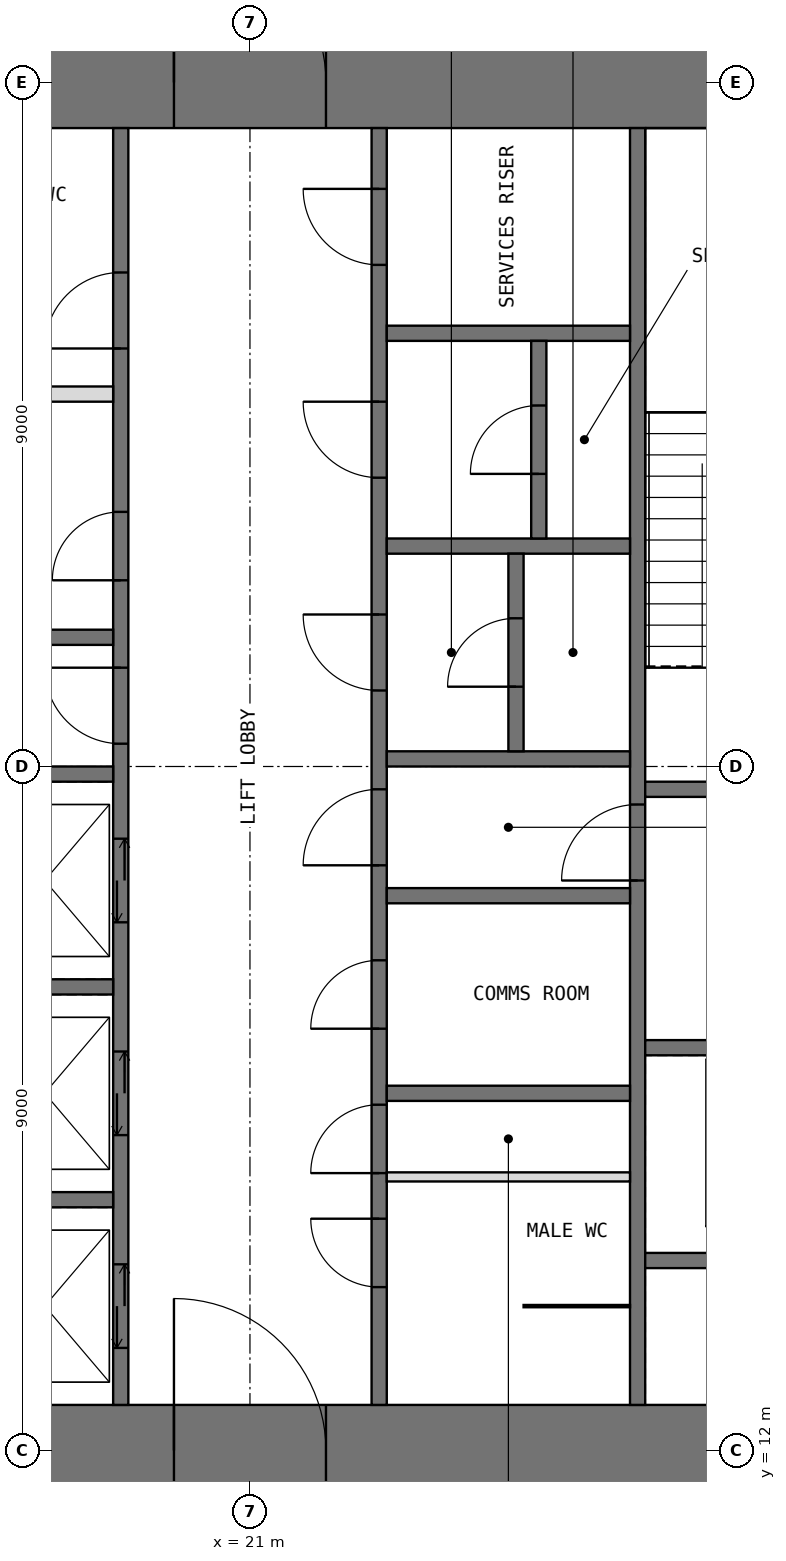
"""IFC4 building model, lengths in metres.
Left out: names, types, materials, properties, quantities, classifications, styles, units other than length and angle.
Written with IfcOpenShell. Run it as: python <this file> out.ifc"""

import sys

from ifc_helpers import new_model, si_unit, direction, frame, frame_2d, origin, place, context, subcontext, project, spatial, rectangle, extrude, element, fill, save


model = new_model("IFC4")
c1 = context("Model", 3, precision=1e-05, world=origin(), true_north=direction((0.0, 1.0)))
c2 = subcontext(c1, "Body", "Model", "MODEL_VIEW")
j1 = project(units=[si_unit("LENGTHUNIT", "METRE"), si_unit("PLANEANGLEUNIT", "RADIAN")], contexts=[c1])
p1 = place(None, origin())
s1 = spatial("IfcSite", under=j1, at=p1, CompositionType="ELEMENT")
p2 = place(p1, origin())
s2 = spatial("IfcBuilding", under=s1, at=p2, CompositionType="ELEMENT")
p3 = place(p2, frame((0.0, 0.0, 256.6)))
s3 = spatial("IfcBuildingStorey", under=s2, at=p3, CompositionType="ELEMENT", Elevation=256.6)
p4 = place(p3, frame((11.4, 12.0, -0.05), z_axis=(0.0, 0.0, 1.0), x_axis=(1.0, 0.0, 0.0)))
e1 = element("IfcWall", 1, at=p4, inside=s3, PredefinedType="SHEAR", context=c2, shape_type="SweptSolid", body=[
    extrude(rectangle(XDim=19.2, YDim=1.2, at=frame_2d((9.6, 0.0))), origin(), (0.0, 0.0, 1.0), 4.2),
])
p5 = place(p4, frame((8.6, 0.0, 0.05)))
e2 = element("IfcOpeningElement", 2, at=p5, cuts=e1, PredefinedType="OPENING", context=c2, shape_type="SweptSolid", body=[
    extrude(rectangle(XDim=2.0, YDim=2.2, at=frame_2d((1.0, 1.1))), frame((0.0, 0.61, 0.0), z_axis=(0.0, -1.0, 0.0), x_axis=(1.0, 0.0, 0.0)), (0.0, 0.0, 1.0), 1.22),
])
p6 = place(p3, frame((11.4, 30.0, -0.05), z_axis=(0.0, 0.0, 1.0), x_axis=(1.0, 0.0, 0.0)))
e3 = element("IfcWall", 3, at=p6, inside=s3, PredefinedType="SHEAR", context=c2, shape_type="SweptSolid", body=[
    extrude(rectangle(XDim=19.2, YDim=1.2, at=frame_2d((9.6, 0.0))), origin(), (0.0, 0.0, 1.0), 4.2),
])
p7 = place(p6, frame((8.6, 0.0, 0.05)))
e4 = element("IfcOpeningElement", 4, at=p7, cuts=e3, PredefinedType="OPENING", context=c2, shape_type="SweptSolid", body=[
    extrude(rectangle(XDim=2.0, YDim=2.2, at=frame_2d((1.0, 1.1))), frame((0.0, 0.61, 0.0), z_axis=(0.0, -1.0, 0.0), x_axis=(1.0, 0.0, 0.0)), (0.0, 0.0, 1.0), 1.22),
])
p8 = place(p3, frame((19.3, 12.6, -0.05), z_axis=(0.0, 0.0, 1.0), x_axis=(0.0, 1.0, 0.0)))
e5 = element("IfcWall", 5, at=p8, inside=s3, PredefinedType="SHEAR", context=c2, shape_type="SweptSolid", body=[
    extrude(rectangle(XDim=16.8, YDim=0.2, at=frame_2d((8.4, 0.0))), origin(), (0.0, 0.0, 1.0), 4.2),
])
p9 = place(p8, frame((8.7, 0.0, 0.05)))
e6 = element("IfcOpeningElement", 6, at=p9, cuts=e5, PredefinedType="OPENING", context=c2, shape_type="SweptSolid", body=[
    extrude(rectangle(XDim=1.0, YDim=2.2, at=frame_2d((0.5, 1.1))), frame((0.0, 0.11, 0.0), z_axis=(0.0, -1.0, 0.0), x_axis=(1.0, 0.0, 0.0)), (0.0, 0.0, 1.0), 0.22),
])
p10 = place(p8, frame((10.85, 0.0, 0.05)))
e7 = element("IfcOpeningElement", 7, at=p10, cuts=e5, PredefinedType="OPENING", context=c2, shape_type="SweptSolid", body=[
    extrude(rectangle(XDim=0.9, YDim=2.2, at=frame_2d((0.45, 1.1))), frame((0.0, 0.11, 0.0), z_axis=(0.0, -1.0, 0.0), x_axis=(1.0, 0.0, 0.0)), (0.0, 0.0, 1.0), 0.22),
])
p11 = place(p8, frame((13.9, 0.0, 0.05)))
e8 = element("IfcOpeningElement", 8, at=p11, cuts=e5, PredefinedType="OPENING", context=c2, shape_type="SweptSolid", body=[
    extrude(rectangle(XDim=1.0, YDim=2.2, at=frame_2d((0.5, 1.1))), frame((0.0, 0.11, 0.0), z_axis=(0.0, -1.0, 0.0), x_axis=(1.0, 0.0, 0.0)), (0.0, 0.0, 1.0), 0.22),
])
p12 = place(p8, frame((0.75, 0.0, 0.05)))
e9 = element("IfcOpeningElement", 9, at=p12, cuts=e5, PredefinedType="OPENING", context=c2, shape_type="SweptSolid", body=[
    extrude(rectangle(XDim=1.1, YDim=2.2, at=frame_2d((0.55, 1.1))), frame((0.0, 0.11, 0.0), z_axis=(0.0, -1.0, 0.0), x_axis=(1.0, 0.0, 0.0)), (0.0, 0.0, 1.0), 0.22),
])
p13 = place(p8, frame((3.55, 0.0, 0.05)))
e10 = element("IfcOpeningElement", 10, at=p13, cuts=e5, PredefinedType="OPENING", context=c2, shape_type="SweptSolid", body=[
    extrude(rectangle(XDim=1.1, YDim=2.2, at=frame_2d((0.55, 1.1))), frame((0.0, 0.11, 0.0), z_axis=(0.0, -1.0, 0.0), x_axis=(1.0, 0.0, 0.0)), (0.0, 0.0, 1.0), 0.22),
])
p14 = place(p8, frame((6.35, 0.0, 0.05)))
e11 = element("IfcOpeningElement", 11, at=p14, cuts=e5, PredefinedType="OPENING", context=c2, shape_type="SweptSolid", body=[
    extrude(rectangle(XDim=1.1, YDim=2.2, at=frame_2d((0.55, 1.1))), frame((0.0, 0.11, 0.0), z_axis=(0.0, -1.0, 0.0), x_axis=(1.0, 0.0, 0.0)), (0.0, 0.0, 1.0), 0.22),
])
p15 = place(p3, frame((22.7, 12.6, -0.05), z_axis=(0.0, 0.0, 1.0), x_axis=(0.0, 1.0, 0.0)))
e12 = element("IfcWall", 12, at=p15, inside=s3, PredefinedType="SHEAR", context=c2, shape_type="SweptSolid", body=[
    extrude(rectangle(XDim=16.8, YDim=0.2, at=frame_2d((8.4, 0.0))), origin(), (0.0, 0.0, 1.0), 4.2),
])
p16 = place(p15, frame((3.05, 0.0, 0.05)))
e13 = element("IfcOpeningElement", 13, at=p16, cuts=e12, PredefinedType="OPENING", context=c2, shape_type="SweptSolid", body=[
    extrude(rectangle(XDim=0.9, YDim=2.2, at=frame_2d((0.45, 1.1))), frame((0.0, 0.11, 0.0), z_axis=(0.0, -1.0, 0.0), x_axis=(1.0, 0.0, 0.0)), (0.0, 0.0, 1.0), 0.22),
])
p17 = place(p15, frame((7.1, 0.0, 0.05)))
e14 = element("IfcOpeningElement", 14, at=p17, cuts=e12, PredefinedType="OPENING", context=c2, shape_type="SweptSolid", body=[
    extrude(rectangle(XDim=1.0, YDim=2.2, at=frame_2d((0.5, 1.1))), frame((0.0, 0.11, 0.0), z_axis=(0.0, -1.0, 0.0), x_axis=(1.0, 0.0, 0.0)), (0.0, 0.0, 1.0), 0.22),
])
p18 = place(p15, frame((1.55, 0.0, 0.05)))
e15 = element("IfcOpeningElement", 15, at=p18, cuts=e12, PredefinedType="OPENING", context=c2, shape_type="SweptSolid", body=[
    extrude(rectangle(XDim=0.9, YDim=2.2, at=frame_2d((0.45, 1.1))), frame((0.0, 0.11, 0.0), z_axis=(0.0, -1.0, 0.0), x_axis=(1.0, 0.0, 0.0)), (0.0, 0.0, 1.0), 0.22),
])
p19 = place(p15, frame((4.95, 0.0, 0.05)))
e16 = element("IfcOpeningElement", 16, at=p19, cuts=e12, PredefinedType="OPENING", context=c2, shape_type="SweptSolid", body=[
    extrude(rectangle(XDim=0.9, YDim=2.2, at=frame_2d((0.45, 1.1))), frame((0.0, 0.11, 0.0), z_axis=(0.0, -1.0, 0.0), x_axis=(1.0, 0.0, 0.0)), (0.0, 0.0, 1.0), 0.22),
])
p20 = place(p15, frame((9.4, 0.0, 0.05)))
e17 = element("IfcOpeningElement", 17, at=p20, cuts=e12, PredefinedType="OPENING", context=c2, shape_type="SweptSolid", body=[
    extrude(rectangle(XDim=1.0, YDim=2.2, at=frame_2d((0.5, 1.1))), frame((0.0, 0.11, 0.0), z_axis=(0.0, -1.0, 0.0), x_axis=(1.0, 0.0, 0.0)), (0.0, 0.0, 1.0), 0.22),
])
p21 = place(p15, frame((12.2, 0.0, 0.05)))
e18 = element("IfcOpeningElement", 18, at=p21, cuts=e12, PredefinedType="OPENING", context=c2, shape_type="SweptSolid", body=[
    extrude(rectangle(XDim=1.0, YDim=2.2, at=frame_2d((0.5, 1.1))), frame((0.0, 0.11, 0.0), z_axis=(0.0, -1.0, 0.0), x_axis=(1.0, 0.0, 0.0)), (0.0, 0.0, 1.0), 0.22),
])
p22 = place(p15, frame((15.0, 0.0, 0.05)))
e19 = element("IfcOpeningElement", 19, at=p22, cuts=e12, PredefinedType="OPENING", context=c2, shape_type="SweptSolid", body=[
    extrude(rectangle(XDim=1.0, YDim=2.2, at=frame_2d((0.5, 1.1))), frame((0.0, 0.11, 0.0), z_axis=(0.0, -1.0, 0.0), x_axis=(1.0, 0.0, 0.0)), (0.0, 0.0, 1.0), 0.22),
])
p23 = place(p3, frame((26.1, 12.6, -0.05), z_axis=(0.0, 0.0, 1.0), x_axis=(0.0, 1.0, 0.0)))
e20 = element("IfcWall", 20, at=p23, inside=s3, PredefinedType="SHEAR", context=c2, shape_type="SweptSolid", body=[
    extrude(rectangle(XDim=16.8, YDim=0.2, at=frame_2d((8.4, 0.0))), origin(), (0.0, 0.0, 1.0), 4.2),
])
p24 = place(p23, frame((6.9, 0.0, 0.05)))
e21 = element("IfcOpeningElement", 21, at=p24, cuts=e20, PredefinedType="OPENING", context=c2, shape_type="SweptSolid", body=[
    extrude(rectangle(XDim=1.0, YDim=2.2, at=frame_2d((0.5, 1.1))), frame((0.0, 0.11, 0.0), z_axis=(0.0, -1.0, 0.0), x_axis=(1.0, 0.0, 0.0)), (0.0, 0.0, 1.0), 0.22),
])
for number, where, z_axis, x_axis in (
    (22, (16.0, 15.3, -0.05), (0.0, 0.0, 1.0), (1.0, 0.0, 0.0)),
    (23, (16.0, 18.1, -0.05), (0.0, 0.0, 1.0), (1.0, 0.0, 0.0)),
    (24, (16.0, 20.9, -0.05), (0.0, 0.0, 1.0), (1.0, 0.0, 0.0)),
    (25, (16.0, 22.7, -0.05), (0.0, 0.0, 1.0), (1.0, 0.0, 0.0)),
):
    element("IfcWall", number, at=place(p3, frame(where, z_axis=z_axis, x_axis=x_axis)), inside=s3, PredefinedType="SHEAR", context=c2, shape_type="SweptSolid", body=[
        extrude(rectangle(XDim=3.2, YDim=0.2, at=frame_2d((1.6, 0.0))), origin(), (0.0, 0.0, 1.0), 4.2),
    ])
p25 = place(p3, frame((16.0, 25.9, 0.0), z_axis=(0.0, 0.0, 1.0), x_axis=(1.0, 0.0, 0.0)))
e26 = element("IfcWall", 26, at=p25, inside=s3, PredefinedType="PARTITIONING", context=c2, shape_type="SweptSolid", body=[
    extrude(rectangle(XDim=3.2, YDim=0.2, at=frame_2d((1.6, 0.0))), origin(), (0.0, 0.0, 1.0), 3.95),
])
for number, where, z_axis, x_axis in (
    (27, (22.8, 16.7, -0.05), (0.0, 0.0, 1.0), (1.0, 0.0, 0.0)),
    (28, (22.8, 19.3, -0.05), (0.0, 0.0, 1.0), (1.0, 0.0, 0.0)),
    (29, (22.8, 21.1, -0.05), (0.0, 0.0, 1.0), (1.0, 0.0, 0.0)),
    (30, (22.8, 23.9, -0.05), (0.0, 0.0, 1.0), (1.0, 0.0, 0.0)),
    (31, (22.8, 26.7, -0.05), (0.0, 0.0, 1.0), (1.0, 0.0, 0.0)),
    (32, (26.2, 14.5, -0.05), (0.0, 0.0, 1.0), (1.0, 0.0, 0.0)),
):
    element("IfcWall", number, at=place(p3, frame(where, z_axis=z_axis, x_axis=x_axis)), inside=s3, PredefinedType="SHEAR", context=c2, shape_type="SweptSolid", body=[
        extrude(rectangle(XDim=3.2, YDim=0.2, at=frame_2d((1.6, 0.0))), origin(), (0.0, 0.0, 1.0), 4.2),
    ])
p26 = place(p3, frame((26.2, 17.3, -0.05), z_axis=(0.0, 0.0, 1.0), x_axis=(1.0, 0.0, 0.0)))
e33 = element("IfcWall", 33, at=p26, inside=s3, PredefinedType="SHEAR", context=c2, shape_type="SweptSolid", body=[
    extrude(rectangle(XDim=3.2, YDim=0.2, at=frame_2d((1.6, 0.0))), origin(), (0.0, 0.0, 1.0), 4.2),
])
p27 = place(p26, frame((1.0, 0.0, 0.05)))
e34 = element("IfcOpeningElement", 34, at=p27, cuts=e33, PredefinedType="OPENING", context=c2, shape_type="SweptSolid", body=[
    extrude(rectangle(XDim=1.2, YDim=2.2, at=frame_2d((0.6, 1.1))), frame((0.0, 0.11, 0.0), z_axis=(0.0, -1.0, 0.0), x_axis=(1.0, 0.0, 0.0)), (0.0, 0.0, 1.0), 0.22),
])
p28 = place(p3, frame((26.2, 20.7, -0.05), z_axis=(0.0, 0.0, 1.0), x_axis=(1.0, 0.0, 0.0)))
e35 = element("IfcWall", 35, at=p28, inside=s3, PredefinedType="SHEAR", context=c2, shape_type="SweptSolid", body=[
    extrude(rectangle(XDim=3.2, YDim=0.2, at=frame_2d((1.6, 0.0))), origin(), (0.0, 0.0, 1.0), 4.2),
])
p29 = place(p28, frame((1.1, 0.0, 0.05)))
e36 = element("IfcOpeningElement", 36, at=p29, cuts=e35, PredefinedType="OPENING", context=c2, shape_type="SweptSolid", body=[
    extrude(rectangle(XDim=1.0, YDim=2.2, at=frame_2d((0.5, 1.1))), frame((0.0, 0.11, 0.0), z_axis=(0.0, -1.0, 0.0), x_axis=(1.0, 0.0, 0.0)), (0.0, 0.0, 1.0), 0.22),
])
p30 = place(p3, frame((22.8, 15.6, 0.0), z_axis=(0.0, 0.0, 1.0), x_axis=(1.0, 0.0, 0.0)))
e37 = element("IfcWall", 37, at=p30, inside=s3, PredefinedType="PARTITIONING", context=c2, shape_type="SweptSolid", body=[
    extrude(rectangle(XDim=3.2, YDim=0.12, at=frame_2d((1.6, 0.0))), origin(), (0.0, 0.0, 1.0), 3.95),
])
p31 = place(p3, frame((24.6, 13.9, 0.0), z_axis=(0.0, 0.0, 1.0), x_axis=(1.0, 0.0, 0.0)))
e38 = element("IfcWall", 38, at=p31, inside=s3, PredefinedType="PARTITIONING", context=c2, shape_type="SweptSolid", body=[
    extrude(rectangle(XDim=1.4, YDim=0.03, at=frame_2d((0.7, 0.0))), origin(), (0.0, 0.0, 1.0), 3.95),
])
p32 = place(p3, frame((24.5, 21.2, -0.05), z_axis=(0.0, 0.0, 1.0), x_axis=(0.0, 1.0, 0.0)))
e39 = element("IfcWall", 39, at=p32, inside=s3, PredefinedType="SHEAR", context=c2, shape_type="SweptSolid", body=[
    extrude(rectangle(XDim=2.6, YDim=0.2, at=frame_2d((1.3, 0.0))), origin(), (0.0, 0.0, 1.0), 4.2),
])
p33 = place(p32, frame((0.85, 0.0, 0.05)))
e40 = element("IfcOpeningElement", 40, at=p33, cuts=e39, PredefinedType="OPENING", context=c2, shape_type="SweptSolid", body=[
    extrude(rectangle(XDim=0.9, YDim=2.2, at=frame_2d((0.45, 1.1))), frame((0.0, 0.11, 0.0), z_axis=(0.0, -1.0, 0.0), x_axis=(1.0, 0.0, 0.0)), (0.0, 0.0, 1.0), 0.22),
])
p34 = place(p3, frame((24.8, 24.0, -0.05), z_axis=(0.0, 0.0, 1.0), x_axis=(0.0, 1.0, 0.0)))
e41 = element("IfcWall", 41, at=p34, inside=s3, PredefinedType="SHEAR", context=c2, shape_type="SweptSolid", body=[
    extrude(rectangle(XDim=2.6, YDim=0.2, at=frame_2d((1.3, 0.0))), origin(), (0.0, 0.0, 1.0), 4.2),
])
p35 = place(p34, frame((0.85, 0.0, 0.05)))
e42 = element("IfcOpeningElement", 42, at=p35, cuts=e41, PredefinedType="OPENING", context=c2, shape_type="SweptSolid", body=[
    extrude(rectangle(XDim=0.9, YDim=2.2, at=frame_2d((0.45, 1.1))), frame((0.0, 0.11, 0.0), z_axis=(0.0, -1.0, 0.0), x_axis=(1.0, 0.0, 0.0)), (0.0, 0.0, 1.0), 0.22),
])
p36 = place(p5, origin())
e43 = element("IfcDoor", 43, at=p36, inside=s3, OperationType="DOUBLE_DOOR_SINGLE_SWING", PredefinedType="DOOR", context=c2, shape_type="SweptSolid", body=[
    extrude(rectangle(XDim=2.0, YDim=2.2, at=frame_2d((1.0, 1.1))), frame((0.0, 0.025, 0.0), z_axis=(0.0, -1.0, 0.0), x_axis=(1.0, 0.0, 0.0)), (0.0, 0.0, 1.0), 0.05),
])
fill(e2, e43)
p37 = place(p7, origin())
e44 = element("IfcDoor", 44, at=p37, inside=s3, OperationType="DOUBLE_DOOR_SINGLE_SWING", PredefinedType="DOOR", context=c2, shape_type="SweptSolid", body=[
    extrude(rectangle(XDim=2.0, YDim=2.2, at=frame_2d((1.0, 1.1))), frame((0.0, 0.025, 0.0), z_axis=(0.0, -1.0, 0.0), x_axis=(1.0, 0.0, 0.0)), (0.0, 0.0, 1.0), 0.05),
])
fill(e4, e44)
p38 = place(p16, origin())
e45 = element("IfcDoor", 45, at=p38, inside=s3, OperationType="SINGLE_SWING_LEFT", PredefinedType="DOOR", context=c2, shape_type="SweptSolid", body=[
    extrude(rectangle(XDim=0.9, YDim=2.2, at=frame_2d((0.45, 1.1))), frame((0.0, 0.025, 0.0), z_axis=(0.0, -1.0, 0.0), x_axis=(1.0, 0.0, 0.0)), (0.0, 0.0, 1.0), 0.05),
])
fill(e13, e45)
p39 = place(p24, origin())
e46 = element("IfcDoor", 46, at=p39, inside=s3, OperationType="SINGLE_SWING_LEFT", PredefinedType="DOOR", context=c2, shape_type="SweptSolid", body=[
    extrude(rectangle(XDim=1.0, YDim=2.2, at=frame_2d((0.5, 1.1))), frame((0.0, 0.025, 0.0), z_axis=(0.0, -1.0, 0.0), x_axis=(1.0, 0.0, 0.0)), (0.0, 0.0, 1.0), 0.05),
])
fill(e21, e46)
p40 = place(p9, origin())
e47 = element("IfcDoor", 47, at=p40, inside=s3, OperationType="SINGLE_SWING_RIGHT", PredefinedType="DOOR", context=c2, shape_type="SweptSolid", body=[
    extrude(rectangle(XDim=1.0, YDim=2.2, at=frame_2d((0.5, 1.1))), frame((0.0, 0.025, 0.0), z_axis=(0.0, -1.0, 0.0), x_axis=(1.0, 0.0, 0.0)), (0.0, 0.0, 1.0), 0.05),
])
fill(e6, e47)
p41 = place(p17, origin())
e48 = element("IfcDoor", 48, at=p41, inside=s3, OperationType="SINGLE_SWING_LEFT", PredefinedType="DOOR", context=c2, shape_type="SweptSolid", body=[
    extrude(rectangle(XDim=1.0, YDim=2.2, at=frame_2d((0.5, 1.1))), frame((0.0, 0.025, 0.0), z_axis=(0.0, -1.0, 0.0), x_axis=(1.0, 0.0, 0.0)), (0.0, 0.0, 1.0), 0.05),
])
fill(e14, e48)
p42 = place(p10, origin())
e49 = element("IfcDoor", 49, at=p42, inside=s3, OperationType="SINGLE_SWING_LEFT", PredefinedType="DOOR", context=c2, shape_type="SweptSolid", body=[
    extrude(rectangle(XDim=0.9, YDim=2.2, at=frame_2d((0.45, 1.1))), frame((0.0, 0.025, 0.0), z_axis=(0.0, -1.0, 0.0), x_axis=(1.0, 0.0, 0.0)), (0.0, 0.0, 1.0), 0.05),
])
fill(e7, e49)
p43 = place(p11, origin())
e50 = element("IfcDoor", 50, at=p43, inside=s3, OperationType="SINGLE_SWING_LEFT", PredefinedType="DOOR", context=c2, shape_type="SweptSolid", body=[
    extrude(rectangle(XDim=1.0, YDim=2.2, at=frame_2d((0.5, 1.1))), frame((0.0, 0.025, 0.0), z_axis=(0.0, -1.0, 0.0), x_axis=(1.0, 0.0, 0.0)), (0.0, 0.0, 1.0), 0.05),
])
fill(e8, e50)
p44 = place(p18, origin())
e51 = element("IfcDoor", 51, at=p44, inside=s3, OperationType="SINGLE_SWING_RIGHT", PredefinedType="DOOR", context=c2, shape_type="SweptSolid", body=[
    extrude(rectangle(XDim=0.9, YDim=2.2, at=frame_2d((0.45, 1.1))), frame((0.0, 0.025, 0.0), z_axis=(0.0, -1.0, 0.0), x_axis=(1.0, 0.0, 0.0)), (0.0, 0.0, 1.0), 0.05),
])
fill(e15, e51)
p45 = place(p19, origin())
e52 = element("IfcDoor", 52, at=p45, inside=s3, OperationType="SINGLE_SWING_LEFT", PredefinedType="DOOR", context=c2, shape_type="SweptSolid", body=[
    extrude(rectangle(XDim=0.9, YDim=2.2, at=frame_2d((0.45, 1.1))), frame((0.0, 0.025, 0.0), z_axis=(0.0, -1.0, 0.0), x_axis=(1.0, 0.0, 0.0)), (0.0, 0.0, 1.0), 0.05),
])
fill(e16, e52)
p46 = place(p20, origin())
e53 = element("IfcDoor", 53, at=p46, inside=s3, OperationType="SINGLE_SWING_RIGHT", PredefinedType="DOOR", context=c2, shape_type="SweptSolid", body=[
    extrude(rectangle(XDim=1.0, YDim=2.2, at=frame_2d((0.5, 1.1))), frame((0.0, 0.025, 0.0), z_axis=(0.0, -1.0, 0.0), x_axis=(1.0, 0.0, 0.0)), (0.0, 0.0, 1.0), 0.05),
])
fill(e17, e53)
p47 = place(p33, origin())
e54 = element("IfcDoor", 54, at=p47, inside=s3, OperationType="SINGLE_SWING_LEFT", PredefinedType="DOOR", context=c2, shape_type="SweptSolid", body=[
    extrude(rectangle(XDim=0.9, YDim=2.2, at=frame_2d((0.45, 1.1))), frame((0.0, 0.025, 0.0), z_axis=(0.0, -1.0, 0.0), x_axis=(1.0, 0.0, 0.0)), (0.0, 0.0, 1.0), 0.05),
])
fill(e40, e54)
p48 = place(p21, origin())
e55 = element("IfcDoor", 55, at=p48, inside=s3, OperationType="SINGLE_SWING_RIGHT", PredefinedType="DOOR", context=c2, shape_type="SweptSolid", body=[
    extrude(rectangle(XDim=1.0, YDim=2.2, at=frame_2d((0.5, 1.1))), frame((0.0, 0.025, 0.0), z_axis=(0.0, -1.0, 0.0), x_axis=(1.0, 0.0, 0.0)), (0.0, 0.0, 1.0), 0.05),
])
fill(e18, e55)
p49 = place(p35, origin())
e56 = element("IfcDoor", 56, at=p49, inside=s3, OperationType="SINGLE_SWING_LEFT", PredefinedType="DOOR", context=c2, shape_type="SweptSolid", body=[
    extrude(rectangle(XDim=0.9, YDim=2.2, at=frame_2d((0.45, 1.1))), frame((0.0, 0.025, 0.0), z_axis=(0.0, -1.0, 0.0), x_axis=(1.0, 0.0, 0.0)), (0.0, 0.0, 1.0), 0.05),
])
fill(e42, e56)
p50 = place(p22, origin())
e57 = element("IfcDoor", 57, at=p50, inside=s3, OperationType="SINGLE_SWING_RIGHT", PredefinedType="DOOR", context=c2, shape_type="SweptSolid", body=[
    extrude(rectangle(XDim=1.0, YDim=2.2, at=frame_2d((0.5, 1.1))), frame((0.0, 0.025, 0.0), z_axis=(0.0, -1.0, 0.0), x_axis=(1.0, 0.0, 0.0)), (0.0, 0.0, 1.0), 0.05),
])
fill(e19, e57)
p51 = place(p12, origin())
e58 = element("IfcDoor", 58, at=p51, inside=s3, OperationType="DOUBLE_DOOR_SLIDING", PredefinedType="DOOR", context=c2, shape_type="SweptSolid", body=[
    extrude(rectangle(XDim=1.1, YDim=2.2, at=frame_2d((0.55, 1.1))), frame((0.0, 0.025, 0.0), z_axis=(0.0, -1.0, 0.0), x_axis=(1.0, 0.0, 0.0)), (0.0, 0.0, 1.0), 0.05),
])
fill(e9, e58)
p52 = place(p13, origin())
e59 = element("IfcDoor", 59, at=p52, inside=s3, OperationType="DOUBLE_DOOR_SLIDING", PredefinedType="DOOR", context=c2, shape_type="SweptSolid", body=[
    extrude(rectangle(XDim=1.1, YDim=2.2, at=frame_2d((0.55, 1.1))), frame((0.0, 0.025, 0.0), z_axis=(0.0, -1.0, 0.0), x_axis=(1.0, 0.0, 0.0)), (0.0, 0.0, 1.0), 0.05),
])
fill(e10, e59)
p53 = place(p14, origin())
e60 = element("IfcDoor", 60, at=p53, inside=s3, OperationType="DOUBLE_DOOR_SLIDING", PredefinedType="DOOR", context=c2, shape_type="SweptSolid", body=[
    extrude(rectangle(XDim=1.1, YDim=2.2, at=frame_2d((0.55, 1.1))), frame((0.0, 0.025, 0.0), z_axis=(0.0, -1.0, 0.0), x_axis=(1.0, 0.0, 0.0)), (0.0, 0.0, 1.0), 0.05),
])
fill(e11, e60)
save(model, sys.argv[1])
